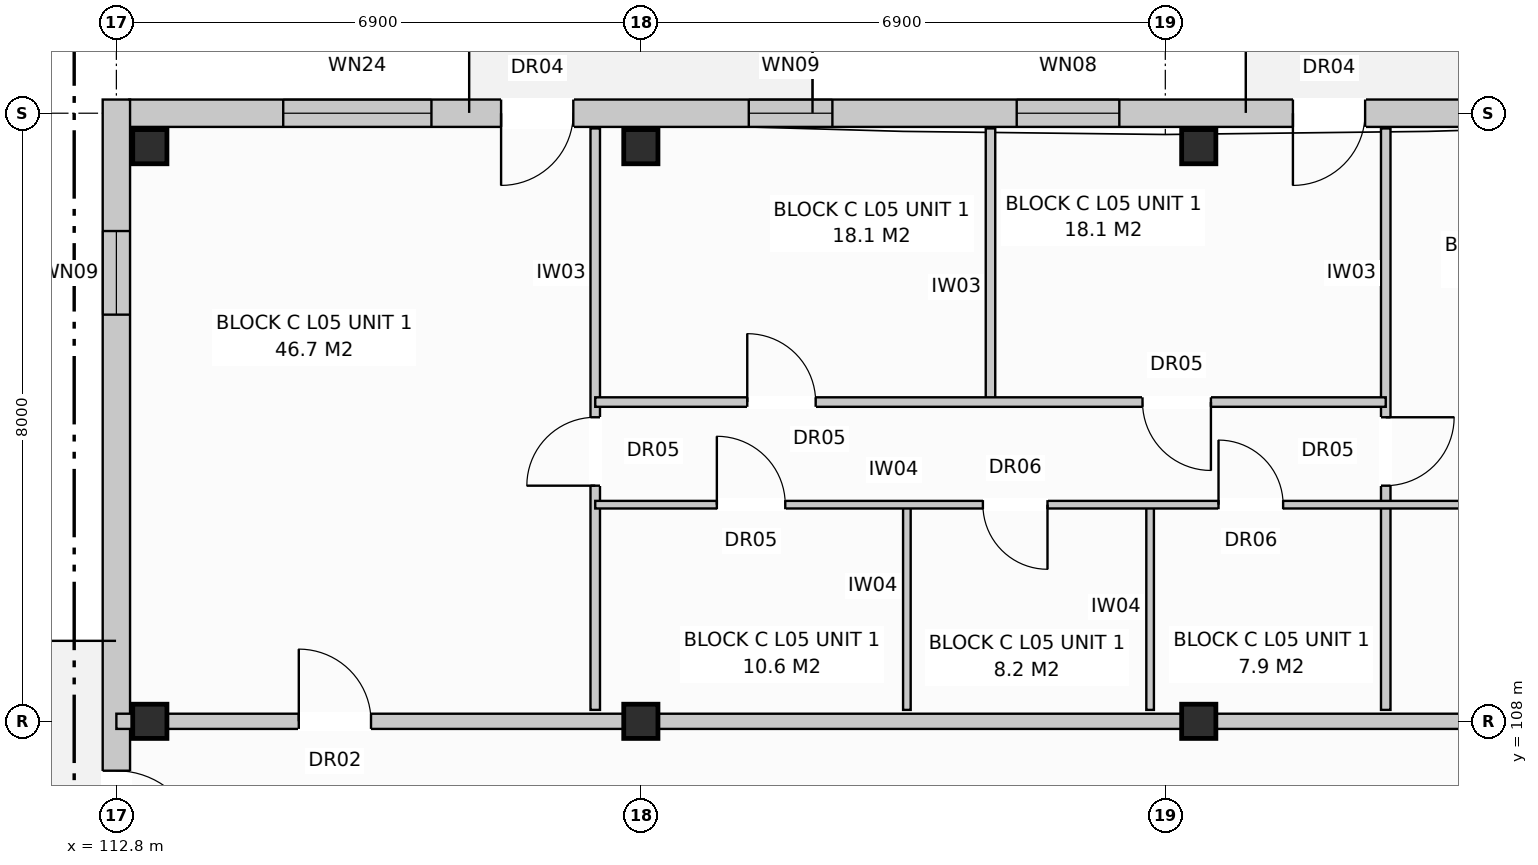
"""IFC4 building model, lengths in metres.
Left out: names, types, materials, properties, quantities, classifications, styles, units other than length and angle.
Written with IfcOpenShell. Run it as: python <this file> out.ifc"""

import sys

from ifc_helpers import new_model, si_unit, direction, frame, frame_2d, origin, origin_with_axes, origin_2d, place, context, subcontext, project, spatial, rectangle, extrude, element, fill, save


model = new_model("IFC4")
c1 = context("Model", 3, precision=1e-05, world=origin(), true_north=direction((0.0, 1.0)))
c2 = subcontext(c1, "Body", "Model", "MODEL_VIEW")
j1 = project(units=[si_unit("LENGTHUNIT", "METRE"), si_unit("PLANEANGLEUNIT", "RADIAN")], contexts=[c1])
p1 = place(None, origin())
s1 = spatial("IfcSite", under=j1, at=p1, CompositionType="ELEMENT")
p2 = place(p1, origin())
s2 = spatial("IfcBuilding", under=s1, at=p2, CompositionType="ELEMENT")
p3 = place(p2, frame((0.0, 0.0, 17.6)))
s3 = spatial("IfcBuildingStorey", under=s2, at=p3, CompositionType="ELEMENT", Elevation=17.6)
for number, where, z_axis, x_axis in (
    (1, (113.24, 108.0, 0.0), (0.0, 0.0, 1.0), (1.0, 0.0, 0.0)),
    (2, (113.24, 115.56, 0.0), (0.0, 0.0, 1.0), (1.0, 0.0, 0.0)),
    (3, (119.7, 108.0, 0.0), (0.0, 0.0, 1.0), (1.0, 0.0, 0.0)),
    (4, (119.7, 115.56, 0.0), (0.0, 0.0, 1.0), (1.0, 0.0, 0.0)),
    (5, (127.04, 108.0, 0.0), (0.0, 0.0, 1.0), (1.0, 0.0, 0.0)),
    (6, (127.04, 115.56, 0.0), (0.0, 0.0, 1.0), (1.0, 0.0, 0.0)),
):
    element("IfcColumn", number, at=place(p3, frame(where, z_axis=z_axis, x_axis=x_axis)), inside=s3, PredefinedType="COLUMN", context=c2, shape_type="SweptSolid", body=[
        extrude(rectangle(XDim=0.45, YDim=0.45, at=origin_2d()), origin(), (0.0, 0.0, 1.0), 3.2),
    ])
p4 = place(p3, frame((112.97, 116.0, 0.0), z_axis=(0.0, 0.0, 1.0), x_axis=(1.0, 0.0, 0.0)))
e7 = element("IfcWall", 7, at=p4, inside=s3, PredefinedType="STANDARD", context=c2, shape_type="SweptSolid", body=[
    extrude(rectangle(XDim=54.86, YDim=0.36, at=frame_2d((27.43, 0.0))), origin(), (0.0, 0.0, 1.0), 2.95),
])
p5 = place(p4, frame((4.891, 0.0, 0.0)))
e8 = element("IfcOpeningElement", 8, at=p5, cuts=e7, PredefinedType="OPENING", context=c2, shape_type="SweptSolid", body=[
    extrude(rectangle(XDim=0.95, YDim=2.1, at=frame_2d((0.475, 1.05))), frame((0.0, 0.192, 0.0), z_axis=(0.0, -1.0, 0.0), x_axis=(1.0, 0.0, 0.0)), (0.0, 0.0, 1.0), 0.384),
])
p6 = place(p4, frame((15.309, 0.0, 0.0)))
e9 = element("IfcOpeningElement", 9, at=p6, cuts=e7, PredefinedType="OPENING", context=c2, shape_type="SweptSolid", body=[
    extrude(rectangle(XDim=0.95, YDim=2.1, at=frame_2d((0.475, 1.05))), frame((0.0, 0.192, 0.0), z_axis=(0.0, -1.0, 0.0), x_axis=(1.0, 0.0, 0.0)), (0.0, 0.0, 1.0), 0.384),
])
p7 = place(p4, frame((31.409, 0.0, 0.0)))
e10 = element("IfcOpeningElement", 10, at=p7, cuts=e7, PredefinedType="OPENING", context=c2, shape_type="SweptSolid", body=[
    extrude(rectangle(XDim=0.95, YDim=2.1, at=frame_2d((0.475, 1.05))), frame((0.0, 0.192, 0.0), z_axis=(0.0, -1.0, 0.0), x_axis=(1.0, 0.0, 0.0)), (0.0, 0.0, 1.0), 0.384),
])
p8 = place(p4, frame((44.309, 0.0, 0.0)))
e11 = element("IfcOpeningElement", 11, at=p8, cuts=e7, PredefinedType="OPENING", context=c2, shape_type="SweptSolid", body=[
    extrude(rectangle(XDim=0.95, YDim=2.1, at=frame_2d((0.475, 1.05))), frame((0.0, 0.192, 0.0), z_axis=(0.0, -1.0, 0.0), x_axis=(1.0, 0.0, 0.0)), (0.0, 0.0, 1.0), 0.384),
])
p9 = place(p4, frame((2.025, 0.0, 0.8)))
e12 = element("IfcOpeningElement", 12, at=p9, cuts=e7, PredefinedType="OPENING", context=c2, shape_type="SweptSolid", body=[
    extrude(rectangle(XDim=1.95, YDim=1.65, at=frame_2d((0.975, 0.825))), frame((0.0, 0.192, 0.0), z_axis=(0.0, -1.0, 0.0), x_axis=(1.0, 0.0, 0.0)), (0.0, 0.0, 1.0), 0.384),
])
p10 = place(p4, frame((8.15, 0.0, 0.72)))
e13 = element("IfcOpeningElement", 13, at=p10, cuts=e7, PredefinedType="OPENING", context=c2, shape_type="SweptSolid", body=[
    extrude(rectangle(XDim=1.1, YDim=1.5, at=frame_2d((0.55, 0.75))), frame((0.0, 0.192, 0.0), z_axis=(0.0, -1.0, 0.0), x_axis=(1.0, 0.0, 0.0)), (0.0, 0.0, 1.0), 0.384),
])
p11 = place(p4, frame((11.675, 0.0, 0.85)))
e14 = element("IfcOpeningElement", 14, at=p11, cuts=e7, PredefinedType="OPENING", context=c2, shape_type="SweptSolid", body=[
    extrude(rectangle(XDim=1.35, YDim=1.6, at=frame_2d((0.675, 0.8))), frame((0.0, 0.192, 0.0), z_axis=(0.0, -1.0, 0.0), x_axis=(1.0, 0.0, 0.0)), (0.0, 0.0, 1.0), 0.384),
])
p12 = place(p4, frame((17.525, 0.0, 0.8)))
e15 = element("IfcOpeningElement", 15, at=p12, cuts=e7, PredefinedType="OPENING", context=c2, shape_type="SweptSolid", body=[
    extrude(rectangle(XDim=1.95, YDim=1.65, at=frame_2d((0.975, 0.825))), frame((0.0, 0.192, 0.0), z_axis=(0.0, -1.0, 0.0), x_axis=(1.0, 0.0, 0.0)), (0.0, 0.0, 1.0), 0.384),
])
p13 = place(p4, frame((21.6, 0.0, 0.8)))
e16 = element("IfcOpeningElement", 16, at=p13, cuts=e7, PredefinedType="OPENING", context=c2, shape_type="SweptSolid", body=[
    extrude(rectangle(XDim=1.8, YDim=1.7, at=frame_2d((0.9, 0.85))), frame((0.0, 0.192, 0.0), z_axis=(0.0, -1.0, 0.0), x_axis=(1.0, 0.0, 0.0)), (0.0, 0.0, 1.0), 0.384),
])
p14 = place(p4, frame((25.35, 0.0, 0.72)))
e17 = element("IfcOpeningElement", 17, at=p14, cuts=e7, PredefinedType="OPENING", context=c2, shape_type="SweptSolid", body=[
    extrude(rectangle(XDim=1.1, YDim=1.5, at=frame_2d((0.55, 0.75))), frame((0.0, 0.192, 0.0), z_axis=(0.0, -1.0, 0.0), x_axis=(1.0, 0.0, 0.0)), (0.0, 0.0, 1.0), 0.384),
])
p15 = place(p4, frame((29.125, 0.0, 0.8)))
e18 = element("IfcOpeningElement", 18, at=p15, cuts=e7, PredefinedType="OPENING", context=c2, shape_type="SweptSolid", body=[
    extrude(rectangle(XDim=1.95, YDim=1.65, at=frame_2d((0.975, 0.825))), frame((0.0, 0.192, 0.0), z_axis=(0.0, -1.0, 0.0), x_axis=(1.0, 0.0, 0.0)), (0.0, 0.0, 1.0), 0.384),
])
p16 = place(p4, frame((34.9, 0.0, 0.8)))
e19 = element("IfcOpeningElement", 19, at=p16, cuts=e7, PredefinedType="OPENING", context=c2, shape_type="SweptSolid", body=[
    extrude(rectangle(XDim=1.8, YDim=1.7, at=frame_2d((0.9, 0.85))), frame((0.0, 0.192, 0.0), z_axis=(0.0, -1.0, 0.0), x_axis=(1.0, 0.0, 0.0)), (0.0, 0.0, 1.0), 0.384),
])
p17 = place(p4, frame((38.45, 0.0, 0.72)))
e20 = element("IfcOpeningElement", 20, at=p17, cuts=e7, PredefinedType="OPENING", context=c2, shape_type="SweptSolid", body=[
    extrude(rectangle(XDim=1.1, YDim=1.5, at=frame_2d((0.55, 0.75))), frame((0.0, 0.192, 0.0), z_axis=(0.0, -1.0, 0.0), x_axis=(1.0, 0.0, 0.0)), (0.0, 0.0, 1.0), 0.384),
])
p18 = place(p4, frame((42.55, 0.0, 0.72)))
e21 = element("IfcOpeningElement", 21, at=p18, cuts=e7, PredefinedType="OPENING", context=c2, shape_type="SweptSolid", body=[
    extrude(rectangle(XDim=1.1, YDim=1.5, at=frame_2d((0.55, 0.75))), frame((0.0, 0.192, 0.0), z_axis=(0.0, -1.0, 0.0), x_axis=(1.0, 0.0, 0.0)), (0.0, 0.0, 1.0), 0.384),
])
p19 = place(p4, frame((45.8, 0.0, 0.8)))
e22 = element("IfcOpeningElement", 22, at=p19, cuts=e7, PredefinedType="OPENING", context=c2, shape_type="SweptSolid", body=[
    extrude(rectangle(XDim=1.8, YDim=1.7, at=frame_2d((0.9, 0.85))), frame((0.0, 0.192, 0.0), z_axis=(0.0, -1.0, 0.0), x_axis=(1.0, 0.0, 0.0)), (0.0, 0.0, 1.0), 0.384),
])
p20 = place(p4, frame((49.15, 0.0, 0.72)))
e23 = element("IfcOpeningElement", 23, at=p20, cuts=e7, PredefinedType="OPENING", context=c2, shape_type="SweptSolid", body=[
    extrude(rectangle(XDim=1.9, YDim=1.85, at=frame_2d((0.95, 0.925))), frame((0.0, 0.192, 0.0), z_axis=(0.0, -1.0, 0.0), x_axis=(1.0, 0.0, 0.0)), (0.0, 0.0, 1.0), 0.384),
])
p21 = place(p4, frame((52.95, 0.0, 0.72)))
e24 = element("IfcOpeningElement", 24, at=p21, cuts=e7, PredefinedType="OPENING", context=c2, shape_type="SweptSolid", body=[
    extrude(rectangle(XDim=1.1, YDim=1.5, at=frame_2d((0.55, 0.75))), frame((0.0, 0.192, 0.0), z_axis=(0.0, -1.0, 0.0), x_axis=(1.0, 0.0, 0.0)), (0.0, 0.0, 1.0), 0.384),
])
p22 = place(p3, frame((112.8, 97.42, 0.0), z_axis=(0.0, 0.0, 1.0), x_axis=(0.0, 1.0, 0.0)))
e25 = element("IfcWall", 25, at=p22, inside=s3, PredefinedType="STANDARD", context=c2, shape_type="SweptSolid", body=[
    extrude(rectangle(XDim=18.76, YDim=0.36, at=frame_2d((9.38, 0.0))), origin(), (0.0, 0.0, 1.0), 2.95),
])
p23 = place(p22, frame((8.83, 0.0, 0.0)))
e26 = element("IfcOpeningElement", 26, at=p23, cuts=e25, PredefinedType="OPENING", context=c2, shape_type="SweptSolid", body=[
    extrude(rectangle(XDim=1.1, YDim=2.1, at=frame_2d((0.55, 1.05))), frame((0.0, 0.192, 0.0), z_axis=(0.0, -1.0, 0.0), x_axis=(1.0, 0.0, 0.0)), (0.0, 0.0, 1.0), 0.384),
])
p24 = place(p22, frame((1.73, 0.0, 0.72)))
e27 = element("IfcOpeningElement", 27, at=p24, cuts=e25, PredefinedType="OPENING", context=c2, shape_type="SweptSolid", body=[
    extrude(rectangle(XDim=1.1, YDim=1.5, at=frame_2d((0.55, 0.75))), frame((0.0, 0.192, 0.0), z_axis=(0.0, -1.0, 0.0), x_axis=(1.0, 0.0, 0.0)), (0.0, 0.0, 1.0), 0.384),
])
p25 = place(p22, frame((15.93, 0.0, 0.72)))
e28 = element("IfcOpeningElement", 28, at=p25, cuts=e25, PredefinedType="OPENING", context=c2, shape_type="SweptSolid", body=[
    extrude(rectangle(XDim=1.1, YDim=1.5, at=frame_2d((0.55, 0.75))), frame((0.0, 0.192, 0.0), z_axis=(0.0, -1.0, 0.0), x_axis=(1.0, 0.0, 0.0)), (0.0, 0.0, 1.0), 0.384),
])
p26 = place(p3, frame((112.8, 108.0, 0.0), z_axis=(0.0, 0.0, 1.0), x_axis=(1.0, 0.0, 0.0)))
e29 = element("IfcWall", 29, at=p26, inside=s3, PredefinedType="PARTITIONING", context=c2, shape_type="SweptSolid", body=[
    extrude(rectangle(XDim=20.7, YDim=0.2, at=frame_2d((10.35, 0.0))), origin(), (0.0, 0.0, 1.0), 2.39),
])
p27 = place(p26, frame((2.4, 0.0, 0.0)))
e30 = element("IfcOpeningElement", 30, at=p27, cuts=e29, PredefinedType="OPENING", context=c2, shape_type="SweptSolid", body=[
    extrude(rectangle(XDim=0.95, YDim=2.15, at=frame_2d((0.475, 1.075))), frame((0.0, 0.112, 0.0), z_axis=(0.0, -1.0, 0.0), x_axis=(1.0, 0.0, 0.0)), (0.0, 0.0, 1.0), 0.224),
])
p28 = place(p3, frame((119.1, 108.15, 0.0), z_axis=(0.0, 0.0, 1.0), x_axis=(0.0, 1.0, 0.0)))
e31 = element("IfcWall", 31, at=p28, inside=s3, PredefinedType="PARTITIONING", context=c2, shape_type="SweptSolid", body=[
    extrude(rectangle(XDim=7.65, YDim=0.125, at=frame_2d((3.825, 0.0))), origin(), (0.0, 0.0, 1.0), 2.95),
])
p29 = place(p28, frame((2.95, 0.0, 0.0)))
e32 = element("IfcOpeningElement", 32, at=p29, cuts=e31, PredefinedType="OPENING", context=c2, shape_type="SweptSolid", body=[
    extrude(rectangle(XDim=0.9, YDim=2.1, at=frame_2d((0.45, 1.05))), frame((0.0, 0.074, 0.0), z_axis=(0.0, -1.0, 0.0), x_axis=(1.0, 0.0, 0.0)), (0.0, 0.0, 1.0), 0.149),
])
p30 = place(p3, frame((123.2, 108.15, 0.0), z_axis=(0.0, 0.0, 1.0), x_axis=(0.0, 1.0, 0.0)))
e33 = element("IfcWall", 33, at=p30, inside=s3, PredefinedType="PARTITIONING", context=c2, shape_type="SweptSolid", body=[
    extrude(rectangle(XDim=2.7, YDim=0.1, at=frame_2d((1.35, 0.0))), origin(), (0.0, 0.0, 1.0), 2.95),
])
p31 = place(p3, frame((126.4, 108.15, 0.0), z_axis=(0.0, 0.0, 1.0), x_axis=(0.0, 1.0, 0.0)))
e34 = element("IfcWall", 34, at=p31, inside=s3, PredefinedType="PARTITIONING", context=c2, shape_type="SweptSolid", body=[
    extrude(rectangle(XDim=2.7, YDim=0.1, at=frame_2d((1.35, 0.0))), origin(), (0.0, 0.0, 1.0), 2.39),
])
p32 = place(p3, frame((124.3, 112.2, 0.0), z_axis=(0.0, 0.0, 1.0), x_axis=(0.0, 1.0, 0.0)))
e35 = element("IfcWall", 35, at=p32, inside=s3, PredefinedType="PARTITIONING", context=c2, shape_type="SweptSolid", body=[
    extrude(rectangle(XDim=3.6, YDim=0.125, at=frame_2d((1.8, 0.0))), origin(), (0.0, 0.0, 1.0), 2.95),
])
p33 = place(p3, frame((129.5, 108.15, 0.0), z_axis=(0.0, 0.0, 1.0), x_axis=(0.0, 1.0, 0.0)))
e36 = element("IfcWall", 36, at=p33, inside=s3, PredefinedType="PARTITIONING", context=c2, shape_type="SweptSolid", body=[
    extrude(rectangle(XDim=7.65, YDim=0.125, at=frame_2d((3.825, 0.0))), origin(), (0.0, 0.0, 1.0), 2.95),
])
p34 = place(p33, frame((2.95, 0.0, 0.0)))
e37 = element("IfcOpeningElement", 37, at=p34, cuts=e36, PredefinedType="OPENING", context=c2, shape_type="SweptSolid", body=[
    extrude(rectangle(XDim=0.9, YDim=2.1, at=frame_2d((0.45, 1.05))), frame((0.0, 0.074, 0.0), z_axis=(0.0, -1.0, 0.0), x_axis=(1.0, 0.0, 0.0)), (0.0, 0.0, 1.0), 0.149),
])
p35 = place(p3, frame((119.1, 110.85, 0.0), z_axis=(0.0, 0.0, 1.0), x_axis=(1.0, 0.0, 0.0)))
e38 = element("IfcWall", 38, at=p35, inside=s3, PredefinedType="PARTITIONING", context=c2, shape_type="SweptSolid", body=[
    extrude(rectangle(XDim=14.3, YDim=0.1, at=frame_2d((7.15, 0.0))), origin(), (0.0, 0.0, 1.0), 2.95),
])
p36 = place(p35, frame((1.6, 0.0, 0.0)))
e39 = element("IfcOpeningElement", 39, at=p36, cuts=e38, PredefinedType="OPENING", context=c2, shape_type="SweptSolid", body=[
    extrude(rectangle(XDim=0.9, YDim=2.1, at=frame_2d((0.45, 1.05))), frame((0.0, 0.062, 0.0), z_axis=(0.0, -1.0, 0.0), x_axis=(1.0, 0.0, 0.0)), (0.0, 0.0, 1.0), 0.124),
])
p37 = place(p35, frame((5.1, 0.0, 0.0)))
e40 = element("IfcOpeningElement", 40, at=p37, cuts=e38, PredefinedType="OPENING", context=c2, shape_type="SweptSolid", body=[
    extrude(rectangle(XDim=0.85, YDim=2.05, at=frame_2d((0.425, 1.025))), frame((0.0, 0.062, 0.0), z_axis=(0.0, -1.0, 0.0), x_axis=(1.0, 0.0, 0.0)), (0.0, 0.0, 1.0), 0.124),
])
p38 = place(p35, frame((8.2, 0.0, 0.0)))
e41 = element("IfcOpeningElement", 41, at=p38, cuts=e38, PredefinedType="OPENING", context=c2, shape_type="SweptSolid", body=[
    extrude(rectangle(XDim=0.85, YDim=2.05, at=frame_2d((0.425, 1.025))), frame((0.0, 0.062, 0.0), z_axis=(0.0, -1.0, 0.0), x_axis=(1.0, 0.0, 0.0)), (0.0, 0.0, 1.0), 0.124),
])
p39 = place(p35, frame((11.6, 0.0, 0.0)))
e42 = element("IfcOpeningElement", 42, at=p39, cuts=e38, PredefinedType="OPENING", context=c2, shape_type="SweptSolid", body=[
    extrude(rectangle(XDim=0.85, YDim=2.05, at=frame_2d((0.425, 1.025))), frame((0.0, 0.062, 0.0), z_axis=(0.0, -1.0, 0.0), x_axis=(1.0, 0.0, 0.0)), (0.0, 0.0, 1.0), 0.124),
])
p40 = place(p3, frame((119.1, 112.2, 0.0), z_axis=(0.0, 0.0, 1.0), x_axis=(1.0, 0.0, 0.0)))
e43 = element("IfcWall", 43, at=p40, inside=s3, PredefinedType="PARTITIONING", context=c2, shape_type="SweptSolid", body=[
    extrude(rectangle(XDim=10.4, YDim=0.125, at=frame_2d((5.2, 0.0))), origin(), (0.0, 0.0, 1.0), 2.95),
])
p41 = place(p40, frame((2.0, 0.0, 0.0)))
e44 = element("IfcOpeningElement", 44, at=p41, cuts=e43, PredefinedType="OPENING", context=c2, shape_type="SweptSolid", body=[
    extrude(rectangle(XDim=0.9, YDim=2.1, at=frame_2d((0.45, 1.05))), frame((0.0, 0.074, 0.0), z_axis=(0.0, -1.0, 0.0), x_axis=(1.0, 0.0, 0.0)), (0.0, 0.0, 1.0), 0.149),
])
p42 = place(p40, frame((7.2, 0.0, 0.0)))
e45 = element("IfcOpeningElement", 45, at=p42, cuts=e43, PredefinedType="OPENING", context=c2, shape_type="SweptSolid", body=[
    extrude(rectangle(XDim=0.9, YDim=2.1, at=frame_2d((0.45, 1.05))), frame((0.0, 0.074, 0.0), z_axis=(0.0, -1.0, 0.0), x_axis=(1.0, 0.0, 0.0)), (0.0, 0.0, 1.0), 0.149),
])
p43 = place(p5, frame((0.95, 0.0, 0.0), z_axis=(0.0, 0.0, 1.0), x_axis=(-1.0, 0.0, 0.0)))
e46 = element("IfcDoor", 46, at=p43, inside=s3, OperationType="SINGLE_SWING_LEFT", PredefinedType="DOOR", context=c2, shape_type="SweptSolid", body=[
    extrude(rectangle(XDim=0.95, YDim=2.1, at=frame_2d((0.475, 1.05))), frame((0.0, 0.025, 0.0), z_axis=(0.0, -1.0, 0.0), x_axis=(1.0, 0.0, 0.0)), (0.0, 0.0, 1.0), 0.05),
])
fill(e8, e46)
p44 = place(p6, frame((0.95, 0.0, 0.0), z_axis=(0.0, 0.0, 1.0), x_axis=(-1.0, 0.0, 0.0)))
e47 = element("IfcDoor", 47, at=p44, inside=s3, OperationType="SINGLE_SWING_LEFT", PredefinedType="DOOR", context=c2, shape_type="SweptSolid", body=[
    extrude(rectangle(XDim=0.95, YDim=2.1, at=frame_2d((0.475, 1.05))), frame((0.0, 0.025, 0.0), z_axis=(0.0, -1.0, 0.0), x_axis=(1.0, 0.0, 0.0)), (0.0, 0.0, 1.0), 0.05),
])
fill(e9, e47)
p45 = place(p9, origin_with_axes())
e48 = element("IfcWindow", 48, at=p45, inside=s3, PartitioningType="SINGLE_PANEL", PredefinedType="WINDOW", context=c2, shape_type="SweptSolid", body=[
    extrude(rectangle(XDim=1.95, YDim=1.65, at=frame_2d((0.975, 0.825))), frame((0.0, 0.03, 0.0), z_axis=(0.0, -1.0, 0.0), x_axis=(1.0, 0.0, 0.0)), (0.0, 0.0, 1.0), 0.06),
])
fill(e12, e48)
p46 = place(p10, origin_with_axes())
e49 = element("IfcWindow", 49, at=p46, inside=s3, PartitioningType="SINGLE_PANEL", PredefinedType="WINDOW", context=c2, shape_type="SweptSolid", body=[
    extrude(rectangle(XDim=1.1, YDim=1.5, at=frame_2d((0.55, 0.75))), frame((0.0, 0.03, 0.0), z_axis=(0.0, -1.0, 0.0), x_axis=(1.0, 0.0, 0.0)), (0.0, 0.0, 1.0), 0.06),
])
fill(e13, e49)
p47 = place(p11, origin_with_axes())
e50 = element("IfcWindow", 50, at=p47, inside=s3, PartitioningType="SINGLE_PANEL", PredefinedType="WINDOW", context=c2, shape_type="SweptSolid", body=[
    extrude(rectangle(XDim=1.35, YDim=1.6, at=frame_2d((0.675, 0.8))), frame((0.0, 0.03, 0.0), z_axis=(0.0, -1.0, 0.0), x_axis=(1.0, 0.0, 0.0)), (0.0, 0.0, 1.0), 0.06),
])
fill(e14, e50)
p48 = place(p23, frame((1.1, 0.0, 0.0), z_axis=(0.0, 0.0, 1.0), x_axis=(-1.0, 0.0, 0.0)))
e51 = element("IfcDoor", 51, at=p48, inside=s3, OperationType="SINGLE_SWING_LEFT", PredefinedType="DOOR", context=c2, shape_type="SweptSolid", body=[
    extrude(rectangle(XDim=1.1, YDim=2.1, at=frame_2d((0.55, 1.05))), frame((0.0, 0.025, 0.0), z_axis=(0.0, -1.0, 0.0), x_axis=(1.0, 0.0, 0.0)), (0.0, 0.0, 1.0), 0.05),
])
fill(e26, e51)
p49 = place(p25, origin_with_axes())
e52 = element("IfcWindow", 52, at=p49, inside=s3, PartitioningType="SINGLE_PANEL", PredefinedType="WINDOW", context=c2, shape_type="SweptSolid", body=[
    extrude(rectangle(XDim=1.1, YDim=1.5, at=frame_2d((0.55, 0.75))), frame((0.0, 0.03, 0.0), z_axis=(0.0, -1.0, 0.0), x_axis=(1.0, 0.0, 0.0)), (0.0, 0.0, 1.0), 0.06),
])
fill(e28, e52)
p50 = place(p27, origin_with_axes())
e53 = element("IfcDoor", 53, at=p50, inside=s3, OperationType="SINGLE_SWING_LEFT", PredefinedType="DOOR", context=c2, shape_type="SweptSolid", body=[
    extrude(rectangle(XDim=0.95, YDim=2.15, at=frame_2d((0.475, 1.075))), frame((0.0, 0.025, 0.0), z_axis=(0.0, -1.0, 0.0), x_axis=(1.0, 0.0, 0.0)), (0.0, 0.0, 1.0), 0.05),
])
fill(e30, e53)
p51 = place(p29, origin_with_axes())
e54 = element("IfcDoor", 54, at=p51, inside=s3, OperationType="SINGLE_SWING_LEFT", PredefinedType="DOOR", context=c2, shape_type="SweptSolid", body=[
    extrude(rectangle(XDim=0.9, YDim=2.1, at=frame_2d((0.45, 1.05))), frame((0.0, 0.025, 0.0), z_axis=(0.0, -1.0, 0.0), x_axis=(1.0, 0.0, 0.0)), (0.0, 0.0, 1.0), 0.05),
])
fill(e32, e54)
p52 = place(p34, frame((0.9, 0.0, 0.0), z_axis=(0.0, 0.0, 1.0), x_axis=(-1.0, 0.0, 0.0)))
e55 = element("IfcDoor", 55, at=p52, inside=s3, OperationType="SINGLE_SWING_RIGHT", PredefinedType="DOOR", context=c2, shape_type="SweptSolid", body=[
    extrude(rectangle(XDim=0.9, YDim=2.1, at=frame_2d((0.45, 1.05))), frame((0.0, 0.025, 0.0), z_axis=(0.0, -1.0, 0.0), x_axis=(1.0, 0.0, 0.0)), (0.0, 0.0, 1.0), 0.05),
])
fill(e37, e55)
p53 = place(p36, origin_with_axes())
e56 = element("IfcDoor", 56, at=p53, inside=s3, OperationType="SINGLE_SWING_LEFT", PredefinedType="DOOR", context=c2, shape_type="SweptSolid", body=[
    extrude(rectangle(XDim=0.9, YDim=2.1, at=frame_2d((0.45, 1.05))), frame((0.0, 0.025, 0.0), z_axis=(0.0, -1.0, 0.0), x_axis=(1.0, 0.0, 0.0)), (0.0, 0.0, 1.0), 0.05),
])
fill(e39, e56)
p54 = place(p37, frame((0.85, 0.0, 0.0), z_axis=(0.0, 0.0, 1.0), x_axis=(-1.0, 0.0, 0.0)))
e57 = element("IfcDoor", 57, at=p54, inside=s3, OperationType="SINGLE_SWING_RIGHT", PredefinedType="DOOR", context=c2, shape_type="SweptSolid", body=[
    extrude(rectangle(XDim=0.85, YDim=2.05, at=frame_2d((0.425, 1.025))), frame((0.0, 0.025, 0.0), z_axis=(0.0, -1.0, 0.0), x_axis=(1.0, 0.0, 0.0)), (0.0, 0.0, 1.0), 0.05),
])
fill(e40, e57)
p55 = place(p38, origin_with_axes())
e58 = element("IfcDoor", 58, at=p55, inside=s3, OperationType="SINGLE_SWING_LEFT", PredefinedType="DOOR", context=c2, shape_type="SweptSolid", body=[
    extrude(rectangle(XDim=0.85, YDim=2.05, at=frame_2d((0.425, 1.025))), frame((0.0, 0.025, 0.0), z_axis=(0.0, -1.0, 0.0), x_axis=(1.0, 0.0, 0.0)), (0.0, 0.0, 1.0), 0.05),
])
fill(e41, e58)
p56 = place(p41, origin_with_axes())
e59 = element("IfcDoor", 59, at=p56, inside=s3, OperationType="SINGLE_SWING_LEFT", PredefinedType="DOOR", context=c2, shape_type="SweptSolid", body=[
    extrude(rectangle(XDim=0.9, YDim=2.1, at=frame_2d((0.45, 1.05))), frame((0.0, 0.025, 0.0), z_axis=(0.0, -1.0, 0.0), x_axis=(1.0, 0.0, 0.0)), (0.0, 0.0, 1.0), 0.05),
])
fill(e44, e59)
p57 = place(p42, frame((0.9, 0.0, 0.0), z_axis=(0.0, 0.0, 1.0), x_axis=(-1.0, 0.0, 0.0)))
e60 = element("IfcDoor", 60, at=p57, inside=s3, OperationType="SINGLE_SWING_RIGHT", PredefinedType="DOOR", context=c2, shape_type="SweptSolid", body=[
    extrude(rectangle(XDim=0.9, YDim=2.1, at=frame_2d((0.45, 1.05))), frame((0.0, 0.025, 0.0), z_axis=(0.0, -1.0, 0.0), x_axis=(1.0, 0.0, 0.0)), (0.0, 0.0, 1.0), 0.05),
])
fill(e45, e60)
save(model, sys.argv[1])
